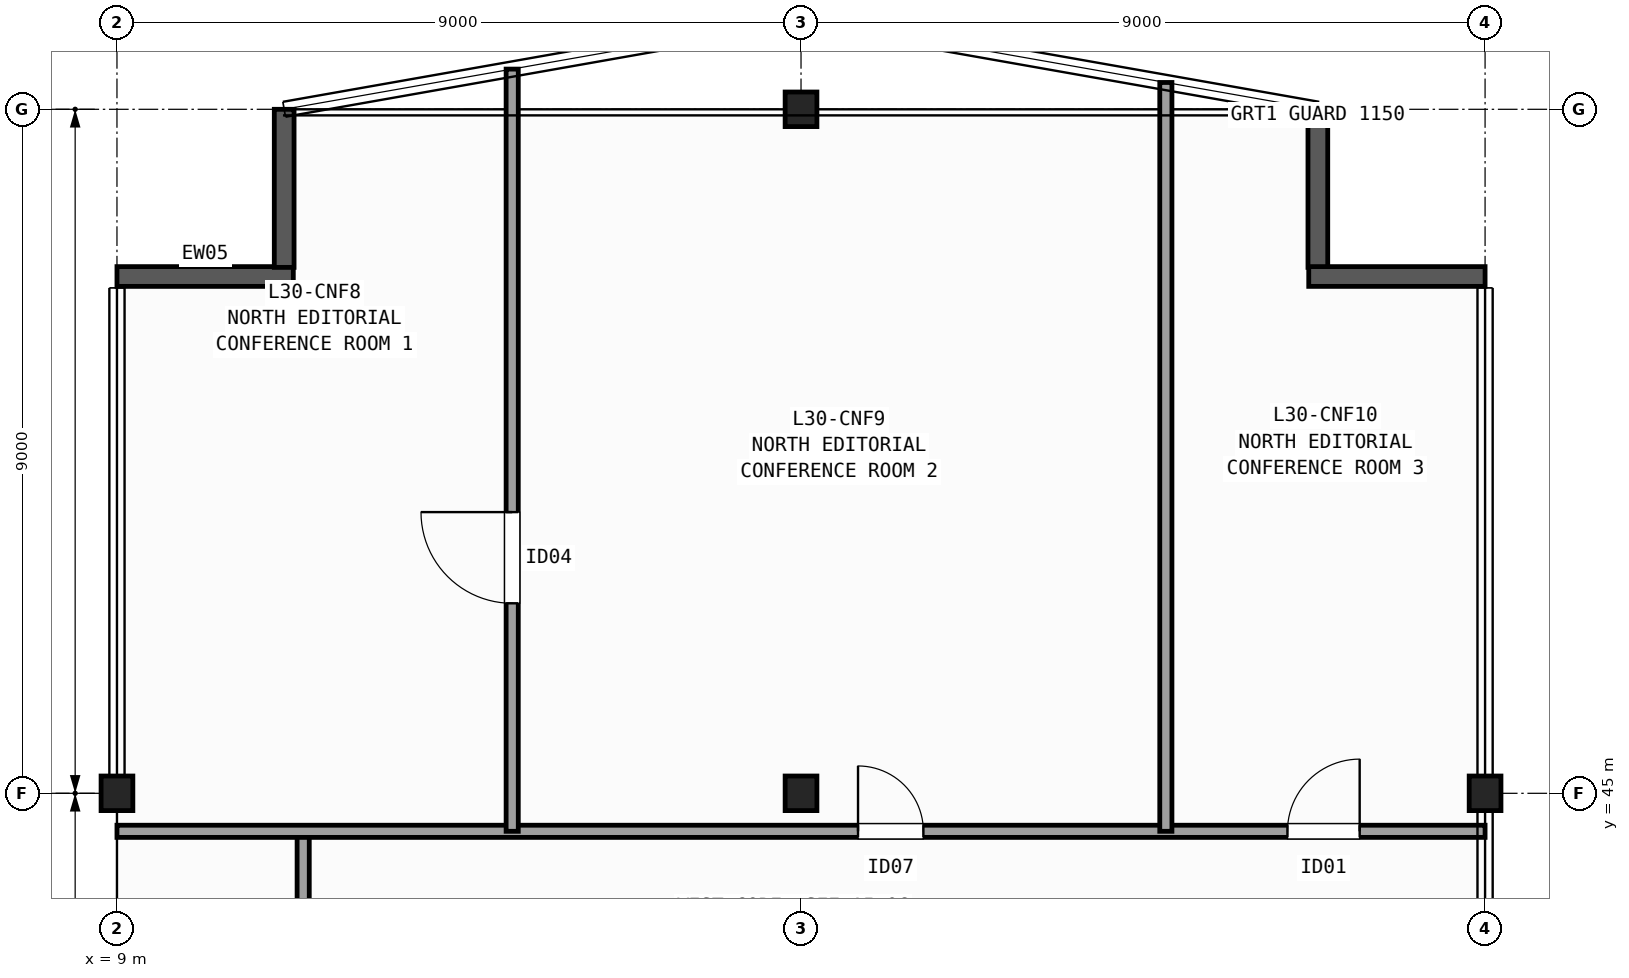
"""IFC4 building model, lengths in metres.
Left out: names, types, materials, properties, quantities, classifications, styles, units other than length and angle.
Written with IfcOpenShell. Run it as: python <this file> out.ifc"""

import sys

from ifc_helpers import new_model, si_unit, direction, frame, frame_2d, origin, origin_2d, place, context, subcontext, project, spatial, rectangle, i_section, extrude, element, fill, save


model = new_model("IFC4")
c1 = context("Model", 3, precision=1e-05, world=origin(), true_north=direction((0.0, 1.0)))
c2 = subcontext(c1, "Body", "Model", "MODEL_VIEW")
j1 = project(units=[si_unit("LENGTHUNIT", "METRE"), si_unit("PLANEANGLEUNIT", "RADIAN")], contexts=[c1])
p1 = place(None, origin())
s1 = spatial("IfcSite", under=j1, at=p1, CompositionType="ELEMENT")
p2 = place(p1, origin())
s2 = spatial("IfcBuilding", under=s1, at=p2, CompositionType="ELEMENT")
p3 = place(p2, frame((0.0, 0.0, 124.8)))
s3 = spatial("IfcBuildingStorey", under=s2, at=p3, CompositionType="ELEMENT", Elevation=124.8)
for number, where, z_axis, x_axis in (
    (1, (9.0, 45.0, 0.0), (0.0, 0.0, 1.0), (1.0, 0.0, 0.0)),
    (2, (18.0, 45.0, 0.0), (0.0, 0.0, 1.0), (1.0, 0.0, 0.0)),
    (3, (18.0, 54.0, 0.0), (0.0, 0.0, 1.0), (1.0, 0.0, 0.0)),
    (4, (27.0, 45.0, 0.0), (0.0, 0.0, 1.0), (1.0, 0.0, 0.0)),
):
    element("IfcColumn", number, at=place(p3, frame(where, z_axis=z_axis, x_axis=x_axis)), inside=s3, PredefinedType="COLUMN", context=c2, shape_type="SweptSolid", body=[
        extrude(i_section(OverallWidth=0.418, OverallDepth=0.455, WebThickness=0.042, FlangeThickness=0.068, FilletRadius=0.015, at=origin_2d()), origin(), (0.0, 0.0, 1.0), 3.7),
    ])
p4 = place(p3, frame((9.0, 51.8, 0.0), z_axis=(0.0, 0.0, 1.0), x_axis=(1.0, 0.0, 0.0)))
e5 = element("IfcWall", 5, at=p4, inside=s3, PredefinedType="SOLIDWALL", context=c2, shape_type="SweptSolid", body=[
    extrude(rectangle(XDim=2.32, YDim=0.26, at=frame_2d((1.16, 0.0))), origin(), (0.0, 0.0, 1.0), 3.42),
])
for number, where, z_axis, x_axis in (
    (6, (11.2, 51.92, 0.0), (0.0, 0.0, 1.0), (0.0, 1.0, 0.0)),
    (7, (24.8, 54.0, 0.0), (0.0, 0.0, 1.0), (0.0, -1.0, 0.0)),
):
    element("IfcWall", number, at=place(p3, frame(where, z_axis=z_axis, x_axis=x_axis)), inside=s3, PredefinedType="SOLIDWALL", context=c2, shape_type="SweptSolid", body=[
        extrude(rectangle(XDim=2.08, YDim=0.26, at=frame_2d((1.04, 0.0))), origin(), (0.0, 0.0, 1.0), 3.42),
    ])
p5 = place(p3, frame((24.68, 51.8, 0.0), z_axis=(0.0, 0.0, 1.0), x_axis=(1.0, 0.0, 0.0)))
e8 = element("IfcWall", 8, at=p5, inside=s3, PredefinedType="SOLIDWALL", context=c2, shape_type="SweptSolid", body=[
    extrude(rectangle(XDim=2.32, YDim=0.26, at=frame_2d((1.16, 0.0))), origin(), (0.0, 0.0, 1.0), 3.42),
])
p6 = place(p3, frame((11.45, 42.4, 0.0), z_axis=(0.0, 0.0, 1.0), x_axis=(0.0, 1.0, 0.0)))
e9 = element("IfcWall", 9, at=p6, inside=s3, PredefinedType="PARTITIONING", context=c2, shape_type="SweptSolid", body=[
    extrude(rectangle(XDim=2.1, YDim=0.16, at=frame_2d((1.05, 0.0))), origin(), (0.0, 0.0, 1.0), 3.42),
])
p7 = place(p3, frame((9.0, 44.5, 0.0), z_axis=(0.0, 0.0, 1.0), x_axis=(1.0, 0.0, 0.0)))
e10 = element("IfcWall", 10, at=p7, inside=s3, PredefinedType="PARTITIONING", context=c2, shape_type="SweptSolid", body=[
    extrude(rectangle(XDim=18.0, YDim=0.16, at=frame_2d((9.0, 0.0))), origin(), (0.0, 0.0, 1.0), 2.634),
])
p8 = place(p7, frame((9.75, 0.0, 0.0)))
e11 = element("IfcOpeningElement", 11, at=p8, cuts=e10, PredefinedType="OPENING", context=c2, shape_type="SweptSolid", body=[
    extrude(rectangle(XDim=0.86, YDim=2.05, at=frame_2d((0.43, 1.025))), frame((0.0, 0.09, 0.0), z_axis=(0.0, -1.0, 0.0), x_axis=(1.0, 0.0, 0.0)), (0.0, 0.0, 1.0), 0.18),
])
p9 = place(p7, frame((15.4, 0.0, 0.0)))
e12 = element("IfcOpeningElement", 12, at=p9, cuts=e10, PredefinedType="OPENING", context=c2, shape_type="SweptSolid", body=[
    extrude(rectangle(XDim=0.95, YDim=2.1, at=frame_2d((0.475, 1.05))), frame((0.0, 0.09, 0.0), z_axis=(0.0, -1.0, 0.0), x_axis=(1.0, 0.0, 0.0)), (0.0, 0.0, 1.0), 0.18),
])
p10 = place(p3, frame((14.2, 44.5, 0.0), z_axis=(0.0, 0.0, 1.0), x_axis=(0.0, 1.0, 0.0)))
e13 = element("IfcWall", 13, at=p10, inside=s3, PredefinedType="PARTITIONING", context=c2, shape_type="SweptSolid", body=[
    extrude(rectangle(XDim=10.029, YDim=0.16, at=frame_2d((5.015, 0.0))), origin(), (0.0, 0.0, 1.0), 3.42),
])
p11 = place(p10, frame((3.0, 0.0, 0.0)))
e14 = element("IfcOpeningElement", 14, at=p11, cuts=e13, PredefinedType="OPENING", context=c2, shape_type="SweptSolid", body=[
    extrude(rectangle(XDim=1.2, YDim=2.15, at=frame_2d((0.6, 1.075))), frame((0.0, 0.09, 0.0), z_axis=(0.0, -1.0, 0.0), x_axis=(1.0, 0.0, 0.0)), (0.0, 0.0, 1.0), 0.18),
])
p12 = place(p3, frame((22.8, 44.5, 0.0), z_axis=(0.0, 0.0, 1.0), x_axis=(0.0, 1.0, 0.0)))
e15 = element("IfcWall", 15, at=p12, inside=s3, PredefinedType="PARTITIONING", context=c2, shape_type="SweptSolid", body=[
    extrude(rectangle(XDim=9.853, YDim=0.16, at=frame_2d((4.927, 0.0))), origin(), (0.0, 0.0, 1.0), 3.42),
])
p13 = place(p11, origin())
e16 = element("IfcDoor", 16, at=p13, inside=s3, OperationType="SINGLE_SWING_RIGHT", PredefinedType="DOOR", context=c2, shape_type="SweptSolid", body=[
    extrude(rectangle(XDim=1.2, YDim=2.15, at=frame_2d((0.6, 1.075))), frame((0.0, 0.025, 0.0), z_axis=(0.0, -1.0, 0.0), x_axis=(1.0, 0.0, 0.0)), (0.0, 0.0, 1.0), 0.05),
])
fill(e14, e16)
p14 = place(p8, origin())
e17 = element("IfcDoor", 17, at=p14, inside=s3, OperationType="SINGLE_SWING_LEFT", PredefinedType="DOOR", context=c2, shape_type="SweptSolid", body=[
    extrude(rectangle(XDim=0.86, YDim=2.05, at=frame_2d((0.43, 1.025))), frame((0.0, 0.025, 0.0), z_axis=(0.0, -1.0, 0.0), x_axis=(1.0, 0.0, 0.0)), (0.0, 0.0, 1.0), 0.05),
])
fill(e11, e17)
p15 = place(p9, origin())
e18 = element("IfcDoor", 18, at=p15, inside=s3, OperationType="SINGLE_SWING_RIGHT", PredefinedType="DOOR", context=c2, shape_type="SweptSolid", body=[
    extrude(rectangle(XDim=0.95, YDim=2.1, at=frame_2d((0.475, 1.05))), frame((0.0, 0.025, 0.0), z_axis=(0.0, -1.0, 0.0), x_axis=(1.0, 0.0, 0.0)), (0.0, 0.0, 1.0), 0.05),
])
fill(e12, e18)
save(model, sys.argv[1])
